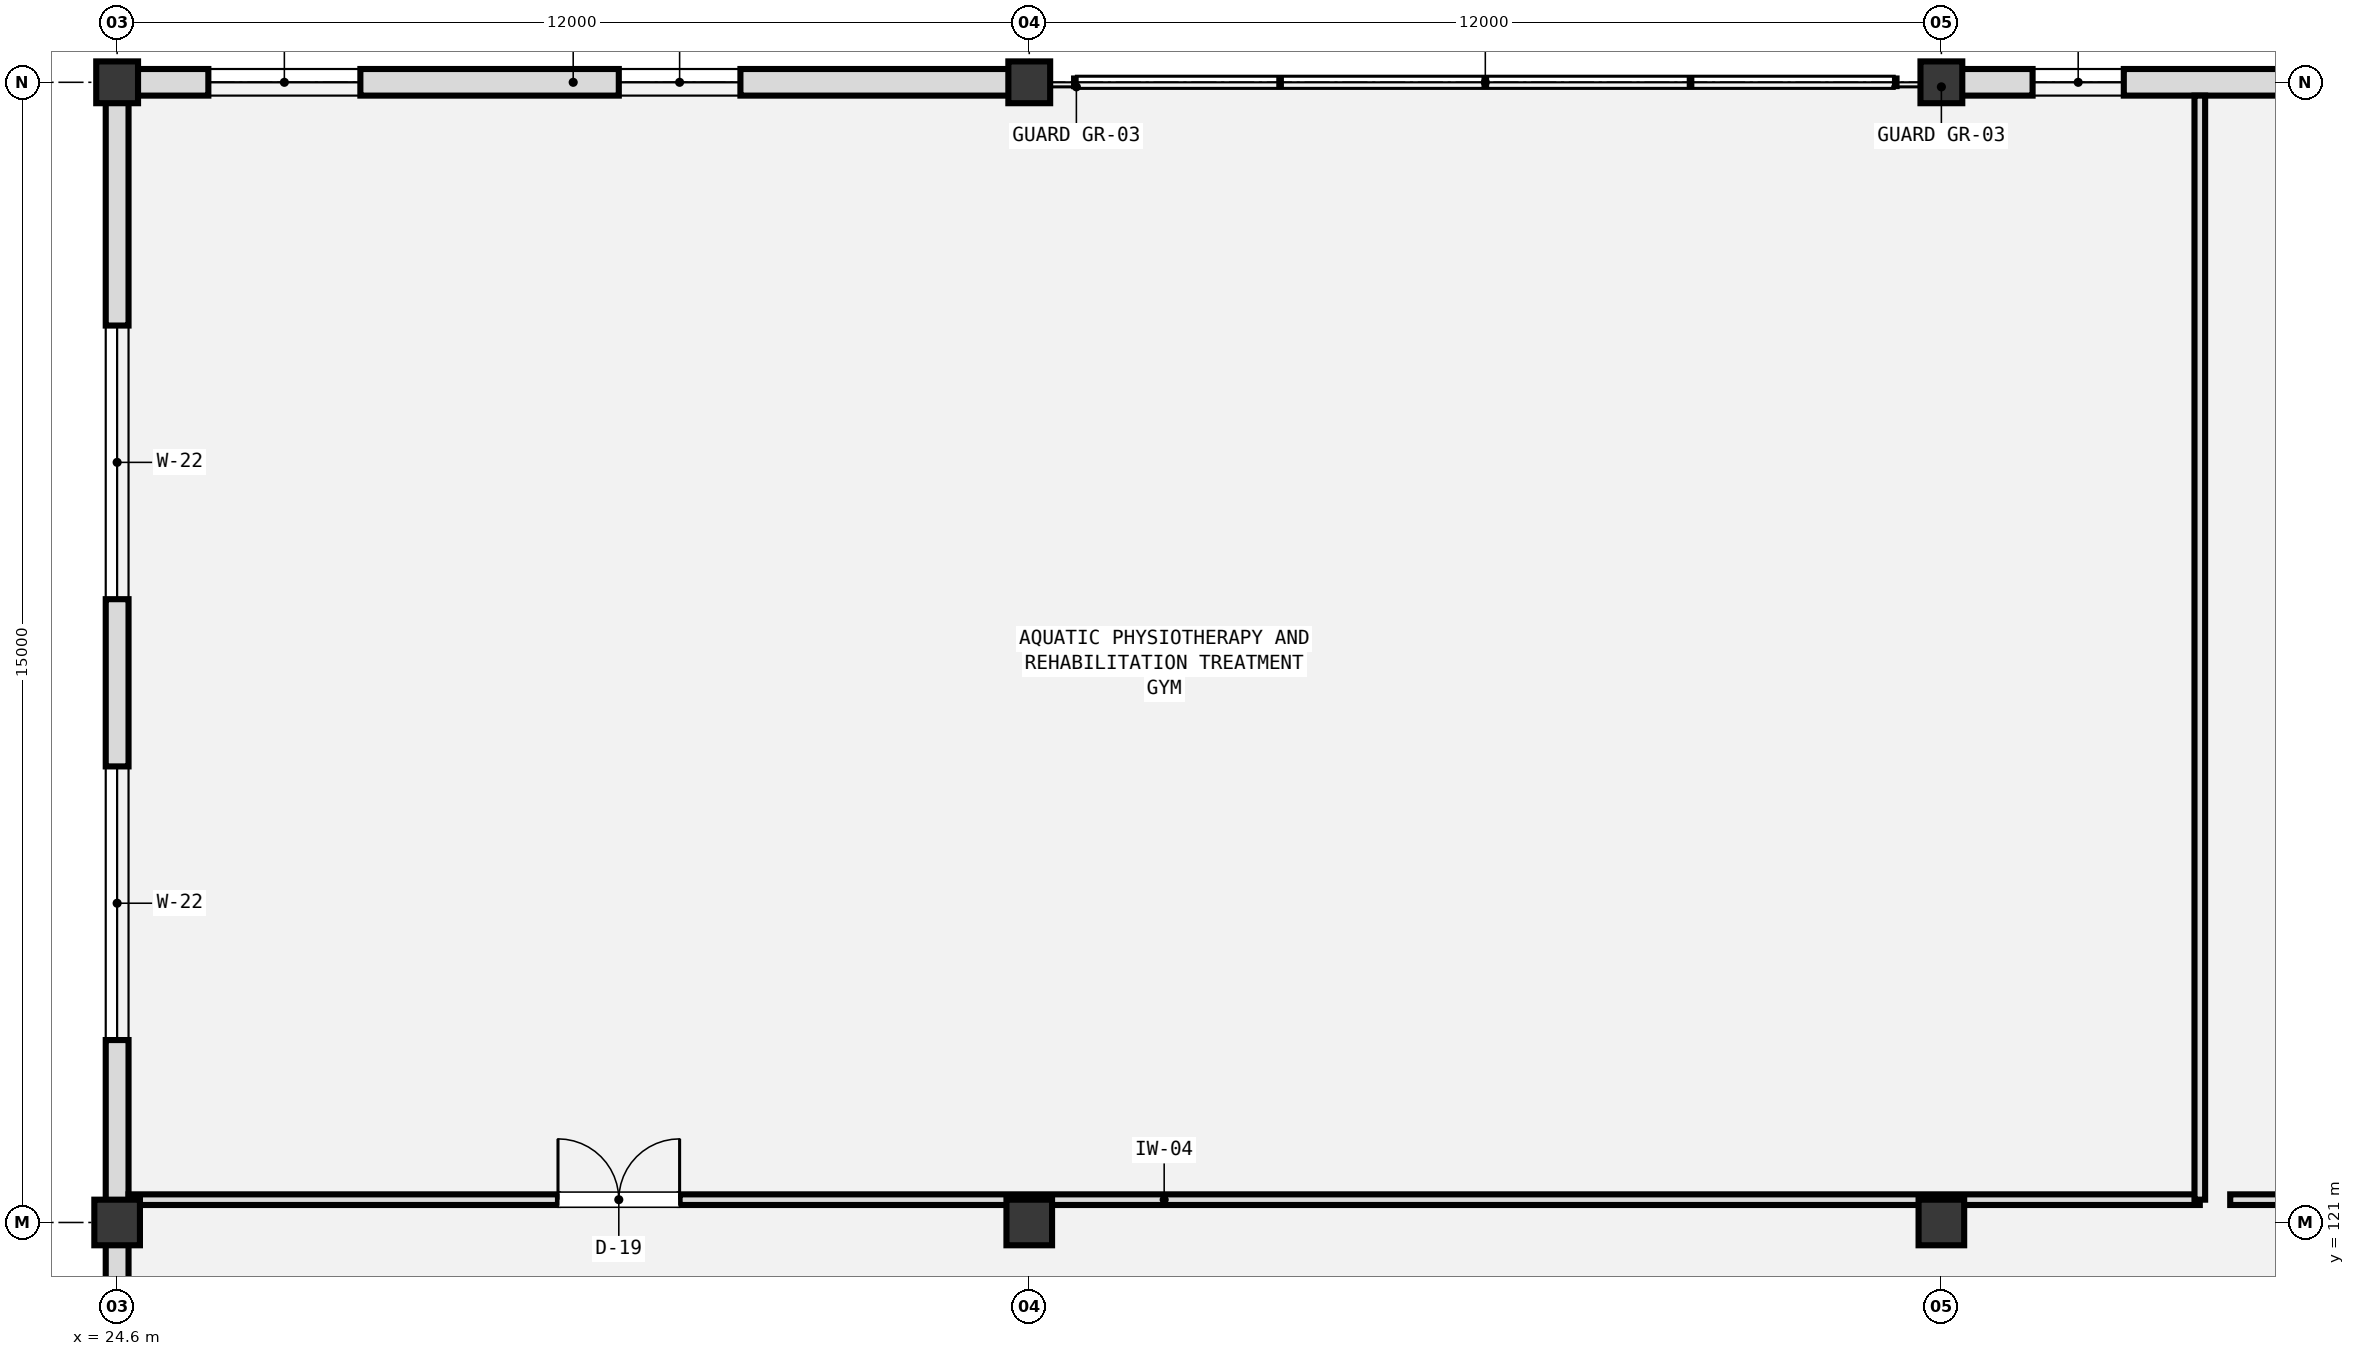
"""IFC4 building model, lengths in metres.
Left out: names, types, materials, properties, quantities, classifications, styles, units other than length and angle.
Written with IfcOpenShell. Run it as: python <this file> out.ifc"""

import sys

from ifc_helpers import new_model, si_unit, direction, frame, frame_2d, origin, origin_2d, place, context, subcontext, project, spatial, rectangle, extrude, element, fill, save


model = new_model("IFC4")
c1 = context("Model", 3, precision=1e-05, world=origin(), true_north=direction((0.0, 1.0)))
c2 = subcontext(c1, "Body", "Model", "MODEL_VIEW")
j1 = project(units=[si_unit("LENGTHUNIT", "METRE"), si_unit("PLANEANGLEUNIT", "RADIAN")], contexts=[c1])
p1 = place(None, origin())
s1 = spatial("IfcSite", under=j1, at=p1, CompositionType="ELEMENT")
p2 = place(p1, origin())
s2 = spatial("IfcBuilding", under=s1, at=p2, CompositionType="ELEMENT")
p3 = place(p2, frame((0.0, 0.0, 9.6)))
s3 = spatial("IfcBuildingStorey", under=s2, at=p3, CompositionType="ELEMENT", Elevation=9.6)
p4 = place(p3, frame((24.6, 121.0, 0.0), z_axis=(0.0, 0.0, 1.0), x_axis=(1.0, 0.0, 0.0)))
e1 = element("IfcColumn", 1, at=p4, inside=s3, PredefinedType="COLUMN", context=c2, shape_type="SweptSolid", body=[
    extrude(rectangle(XDim=0.6, YDim=0.6, at=origin_2d()), origin(), (0.0, 0.0, 1.0), 4.48),
])
p5 = place(p3, frame((24.6, 136.0, 0.0), z_axis=(0.0, 0.0, 1.0), x_axis=(1.0, 0.0, 0.0)))
e2 = element("IfcColumn", 2, at=p5, inside=s3, PredefinedType="COLUMN", context=c2, shape_type="SweptSolid", body=[
    extrude(rectangle(XDim=0.55, YDim=0.55, at=origin_2d()), origin(), (0.0, 0.0, 1.0), 4.48),
])
p6 = place(p3, frame((36.6, 121.0, 0.0), z_axis=(0.0, 0.0, 1.0), x_axis=(1.0, 0.0, 0.0)))
e3 = element("IfcColumn", 3, at=p6, inside=s3, PredefinedType="COLUMN", context=c2, shape_type="SweptSolid", body=[
    extrude(rectangle(XDim=0.6, YDim=0.6, at=origin_2d()), origin(), (0.0, 0.0, 1.0), 4.8),
])
p7 = place(p3, frame((36.6, 136.0, 0.0), z_axis=(0.0, 0.0, 1.0), x_axis=(1.0, 0.0, 0.0)))
e4 = element("IfcColumn", 4, at=p7, inside=s3, PredefinedType="COLUMN", context=c2, shape_type="SweptSolid", body=[
    extrude(rectangle(XDim=0.55, YDim=0.55, at=origin_2d()), origin(), (0.0, 0.0, 1.0), 4.8),
])
p8 = place(p3, frame((48.6, 121.0, 0.0), z_axis=(0.0, 0.0, 1.0), x_axis=(1.0, 0.0, 0.0)))
e5 = element("IfcColumn", 5, at=p8, inside=s3, PredefinedType="COLUMN", context=c2, shape_type="SweptSolid", body=[
    extrude(rectangle(XDim=0.6, YDim=0.6, at=origin_2d()), origin(), (0.0, 0.0, 1.0), 4.8),
])
p9 = place(p3, frame((48.6, 136.0, 0.0), z_axis=(0.0, 0.0, 1.0), x_axis=(1.0, 0.0, 0.0)))
e6 = element("IfcColumn", 6, at=p9, inside=s3, PredefinedType="COLUMN", context=c2, shape_type="SweptSolid", body=[
    extrude(rectangle(XDim=0.55, YDim=0.55, at=origin_2d()), origin(), (0.0, 0.0, 1.0), 4.8),
])
p10 = place(p3, frame((24.6, 136.0, 0.0), z_axis=(0.0, 0.0, 1.0), x_axis=(1.0, 0.0, 0.0)))
e7 = element("IfcWall", 7, at=p10, inside=s3, PredefinedType="SOLIDWALL", context=c2, shape_type="SweptSolid", body=[
    extrude(rectangle(XDim=12.0, YDim=0.35, at=frame_2d((6.0, 0.0))), origin(), (0.0, 0.0, 1.0), 4.04),
])
p11 = place(p10, frame((1.2, 0.0, 0.95)))
e8 = element("IfcOpeningElement", 8, at=p11, cuts=e7, PredefinedType="OPENING", context=c2, shape_type="SweptSolid", body=[
    extrude(rectangle(XDim=2.0, YDim=1.5, at=frame_2d((1.0, 0.75))), frame((0.0, 0.185, 0.0), z_axis=(0.0, -1.0, 0.0), x_axis=(1.0, 0.0, 0.0)), (0.0, 0.0, 1.0), 0.37),
])
p12 = place(p10, frame((6.6, 0.0, 0.95)))
e9 = element("IfcOpeningElement", 9, at=p12, cuts=e7, PredefinedType="OPENING", context=c2, shape_type="SweptSolid", body=[
    extrude(rectangle(XDim=1.6, YDim=1.5, at=frame_2d((0.8, 0.75))), frame((0.0, 0.185, 0.0), z_axis=(0.0, -1.0, 0.0), x_axis=(1.0, 0.0, 0.0)), (0.0, 0.0, 1.0), 0.37),
])
p13 = place(p3, frame((48.6, 136.0, 0.0), z_axis=(0.0, 0.0, 1.0), x_axis=(1.0, 0.0, 0.0)))
e10 = element("IfcWall", 10, at=p13, inside=s3, PredefinedType="SOLIDWALL", context=c2, shape_type="SweptSolid", body=[
    extrude(rectangle(XDim=12.0, YDim=0.35, at=frame_2d((6.0, 0.0))), origin(), (0.0, 0.0, 1.0), 4.04),
])
p14 = place(p13, frame((1.2, 0.0, 0.95)))
e11 = element("IfcOpeningElement", 11, at=p14, cuts=e10, PredefinedType="OPENING", context=c2, shape_type="SweptSolid", body=[
    extrude(rectangle(XDim=1.2, YDim=1.5, at=frame_2d((0.6, 0.75))), frame((0.0, 0.185, 0.0), z_axis=(0.0, -1.0, 0.0), x_axis=(1.0, 0.0, 0.0)), (0.0, 0.0, 1.0), 0.37),
])
p15 = place(p13, frame((6.6, 0.0, 0.95)))
e12 = element("IfcOpeningElement", 12, at=p15, cuts=e10, PredefinedType="OPENING", context=c2, shape_type="SweptSolid", body=[
    extrude(rectangle(XDim=0.9, YDim=1.5, at=frame_2d((0.45, 0.75))), frame((0.0, 0.185, 0.0), z_axis=(0.0, -1.0, 0.0), x_axis=(1.0, 0.0, 0.0)), (0.0, 0.0, 1.0), 0.37),
])
p16 = place(p3, frame((24.6, 108.6, 0.0), z_axis=(0.0, 0.0, 1.0), x_axis=(0.0, 1.0, 0.0)))
e13 = element("IfcWall", 13, at=p16, inside=s3, PredefinedType="SOLIDWALL", context=c2, shape_type="SweptSolid", body=[
    extrude(rectangle(XDim=27.4, YDim=0.3, at=frame_2d((13.7, 0.0))), origin(), (0.0, 0.0, 1.0), 3.93),
])
p17 = place(p16, frame((3.2, 0.0, 0.9)))
e14 = element("IfcOpeningElement", 14, at=p17, cuts=e13, PredefinedType="OPENING", context=c2, shape_type="SweptSolid", body=[
    extrude(rectangle(XDim=3.0, YDim=1.65, at=frame_2d((1.5, 0.825))), frame((0.0, 0.16, 0.0), z_axis=(0.0, -1.0, 0.0), x_axis=(1.0, 0.0, 0.0)), (0.0, 0.0, 1.0), 0.32),
])
p18 = place(p16, frame((14.8, 0.0, 0.9)))
e15 = element("IfcOpeningElement", 15, at=p18, cuts=e13, PredefinedType="OPENING", context=c2, shape_type="SweptSolid", body=[
    extrude(rectangle(XDim=3.6, YDim=1.65, at=frame_2d((1.8, 0.825))), frame((0.0, 0.16, 0.0), z_axis=(0.0, -1.0, 0.0), x_axis=(1.0, 0.0, 0.0)), (0.0, 0.0, 1.0), 0.32),
])
p19 = place(p16, frame((20.6, 0.0, 0.9)))
e16 = element("IfcOpeningElement", 16, at=p19, cuts=e13, PredefinedType="OPENING", context=c2, shape_type="SweptSolid", body=[
    extrude(rectangle(XDim=3.6, YDim=1.65, at=frame_2d((1.8, 0.825))), frame((0.0, 0.16, 0.0), z_axis=(0.0, -1.0, 0.0), x_axis=(1.0, 0.0, 0.0)), (0.0, 0.0, 1.0), 0.32),
])
p20 = place(p3, frame((24.75, 121.3, 0.0), z_axis=(0.0, 0.0, 1.0), x_axis=(1.0, 0.0, 0.0)))
e17 = element("IfcWall", 17, at=p20, inside=s3, PredefinedType="PARTITIONING", context=c2, shape_type="SweptSolid", body=[
    extrude(rectangle(XDim=27.25, YDim=0.14, at=frame_2d((13.625, 0.0))), origin(), (0.0, 0.0, 1.0), 3.3),
])
p21 = place(p20, frame((5.65, 0.0, 0.0)))
e18 = element("IfcOpeningElement", 18, at=p21, cuts=e17, PredefinedType="OPENING", context=c2, shape_type="SweptSolid", body=[
    extrude(rectangle(XDim=1.6, YDim=2.2, at=frame_2d((0.8, 1.1))), frame((0.0, 0.08, 0.0), z_axis=(0.0, -1.0, 0.0), x_axis=(1.0, 0.0, 0.0)), (0.0, 0.0, 1.0), 0.16),
])
p22 = place(p3, frame((52.0, 121.3, 0.0), z_axis=(0.0, 0.0, 1.0), x_axis=(0.0, 1.0, 0.0)))
e19 = element("IfcWall", 19, at=p22, inside=s3, PredefinedType="PARTITIONING", context=c2, shape_type="SweptSolid", body=[
    extrude(rectangle(XDim=14.525, YDim=0.14, at=frame_2d((7.262, 0.0))), origin(), (0.0, 0.0, 1.0), 3.3),
])
p23 = place(p3, frame((52.4, 121.3, 0.0), z_axis=(0.0, 0.0, 1.0), x_axis=(1.0, 0.0, 0.0)))
e20 = element("IfcWall", 20, at=p23, inside=s3, PredefinedType="PARTITIONING", context=c2, shape_type="SweptSolid", body=[
    extrude(rectangle(XDim=23.6, YDim=0.14, at=frame_2d((11.8, 0.0))), origin(), (0.0, 0.0, 1.0), 3.3),
])
p24 = place(p23, frame((10.0, 0.0, 0.0)))
e21 = element("IfcOpeningElement", 21, at=p24, cuts=e20, PredefinedType="OPENING", context=c2, shape_type="SweptSolid", body=[
    extrude(rectangle(XDim=1.1, YDim=2.2, at=frame_2d((0.55, 1.1))), frame((0.0, 0.08, 0.0), z_axis=(0.0, -1.0, 0.0), x_axis=(1.0, 0.0, 0.0)), (0.0, 0.0, 1.0), 0.16),
])
p25 = place(p11, origin())
e22 = element("IfcWindow", 22, at=p25, inside=s3, PartitioningType="DOUBLE_PANEL_VERTICAL", PredefinedType="WINDOW", context=c2, shape_type="SweptSolid", body=[
    extrude(rectangle(XDim=2.0, YDim=1.5, at=frame_2d((1.0, 0.75))), frame((0.0, 0.03, 0.0), z_axis=(0.0, -1.0, 0.0), x_axis=(1.0, 0.0, 0.0)), (0.0, 0.0, 1.0), 0.06),
])
fill(e8, e22)
p26 = place(p12, origin())
e23 = element("IfcWindow", 23, at=p26, inside=s3, PartitioningType="SINGLE_PANEL", PredefinedType="WINDOW", context=c2, shape_type="SweptSolid", body=[
    extrude(rectangle(XDim=1.6, YDim=1.5, at=frame_2d((0.8, 0.75))), frame((0.0, 0.03, 0.0), z_axis=(0.0, -1.0, 0.0), x_axis=(1.0, 0.0, 0.0)), (0.0, 0.0, 1.0), 0.06),
])
fill(e9, e23)
p27 = place(p14, origin())
e24 = element("IfcWindow", 24, at=p27, inside=s3, PartitioningType="SINGLE_PANEL", PredefinedType="WINDOW", context=c2, shape_type="SweptSolid", body=[
    extrude(rectangle(XDim=1.2, YDim=1.5, at=frame_2d((0.6, 0.75))), frame((0.0, 0.03, 0.0), z_axis=(0.0, -1.0, 0.0), x_axis=(1.0, 0.0, 0.0)), (0.0, 0.0, 1.0), 0.06),
])
fill(e11, e24)
p28 = place(p18, origin())
e25 = element("IfcWindow", 25, at=p28, inside=s3, PartitioningType="TRIPLE_PANEL_HORIZONTAL", PredefinedType="WINDOW", context=c2, shape_type="SweptSolid", body=[
    extrude(rectangle(XDim=3.6, YDim=1.65, at=frame_2d((1.8, 0.825))), frame((0.0, 0.03, 0.0), z_axis=(0.0, -1.0, 0.0), x_axis=(1.0, 0.0, 0.0)), (0.0, 0.0, 1.0), 0.06),
])
fill(e15, e25)
p29 = place(p19, origin())
e26 = element("IfcWindow", 26, at=p29, inside=s3, PartitioningType="TRIPLE_PANEL_HORIZONTAL", PredefinedType="WINDOW", context=c2, shape_type="SweptSolid", body=[
    extrude(rectangle(XDim=3.6, YDim=1.65, at=frame_2d((1.8, 0.825))), frame((0.0, 0.03, 0.0), z_axis=(0.0, -1.0, 0.0), x_axis=(1.0, 0.0, 0.0)), (0.0, 0.0, 1.0), 0.06),
])
fill(e16, e26)
p30 = place(p21, origin())
e27 = element("IfcDoor", 27, at=p30, inside=s3, OperationType="DOUBLE_DOOR_SINGLE_SWING", PredefinedType="DOOR", context=c2, shape_type="SweptSolid", body=[
    extrude(rectangle(XDim=1.6, YDim=2.2, at=frame_2d((0.8, 1.1))), frame((0.0, 0.025, 0.0), z_axis=(0.0, -1.0, 0.0), x_axis=(1.0, 0.0, 0.0)), (0.0, 0.0, 1.0), 0.05),
])
fill(e18, e27)
save(model, sys.argv[1])
